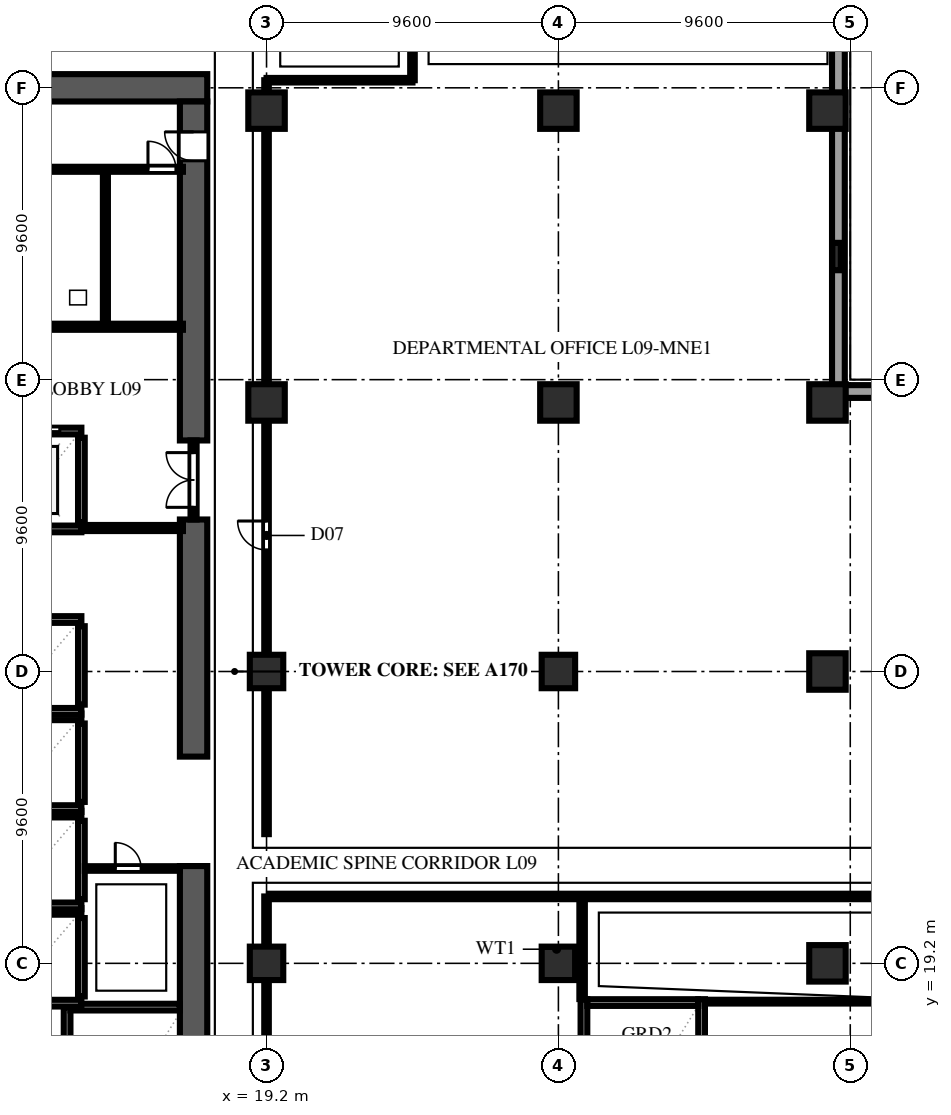
"""IFC4 building model, lengths in metres.
Left out: names, types, materials, properties, quantities, classifications, styles, units other than length and angle.
Written with IfcOpenShell. Run it as: python <this file> out.ifc"""

import sys

from ifc_helpers import new_model, si_unit, direction, frame, frame_2d, origin, origin_2d, place, context, subcontext, project, spatial, rectangle, extrude, element, fill, save


model = new_model("IFC4")
c1 = context("Model", 3, precision=1e-05, world=origin(), true_north=direction((0.0, 1.0)))
c2 = subcontext(c1, "Body", "Model", "MODEL_VIEW")
j1 = project(units=[si_unit("LENGTHUNIT", "METRE"), si_unit("PLANEANGLEUNIT", "RADIAN")], contexts=[c1])
p1 = place(None, origin())
s1 = spatial("IfcSite", under=j1, at=p1, CompositionType="ELEMENT")
p2 = place(p1, origin())
s2 = spatial("IfcBuilding", under=s1, at=p2, CompositionType="ELEMENT")
p3 = place(p2, frame((0.0, 0.0, 39.4)))
s3 = spatial("IfcBuildingStorey", under=s2, at=p3, CompositionType="ELEMENT", Elevation=39.4)
p4 = place(p3, frame((2.65, 48.0, 0.0), z_axis=(0.0, 0.0, 1.0), x_axis=(1.0, 0.0, 0.0)))
e1 = element("IfcWall", 1, at=p4, inside=s3, PredefinedType="SHEAR", context=c2, shape_type="SweptSolid", body=[
    extrude(rectangle(XDim=14.6, YDim=0.9, at=frame_2d((7.3, 0.0))), origin(), (0.0, 0.0, 1.0), 3.54),
])
p5 = place(p3, frame((16.8, 10.05, 0.0), z_axis=(0.0, 0.0, 1.0), x_axis=(0.0, 1.0, 0.0)))
e2 = element("IfcWall", 2, at=p5, inside=s3, PredefinedType="SHEAR", context=c2, shape_type="SweptSolid", body=[
    extrude(rectangle(XDim=12.35, YDim=0.9, at=frame_2d((6.175, 0.0))), origin(), (0.0, 0.0, 1.0), 3.54),
])
p6 = place(p5, frame((0.09, 0.0, 0.0)))
e3 = element("IfcOpeningElement", 3, at=p6, cuts=e2, PredefinedType="OPENING", context=c2, shape_type="SweptSolid", body=[
    extrude(rectangle(XDim=1.1, YDim=2.2, at=frame_2d((0.55, 1.1))), frame((0.0, 0.462, 0.0), z_axis=(0.0, -1.0, 0.0), x_axis=(1.0, 0.0, 0.0)), (0.0, 0.0, 1.0), 0.924),
])
p7 = place(p3, frame((16.8, 26.0, 0.0), z_axis=(0.0, 0.0, 1.0), x_axis=(0.0, 1.0, 0.0)))
e4 = element("IfcWall", 4, at=p7, inside=s3, PredefinedType="SHEAR", context=c2, shape_type="SweptSolid", body=[
    extrude(rectangle(XDim=7.8, YDim=0.9, at=frame_2d((3.9, 0.0))), origin(), (0.0, 0.0, 1.0), 3.54),
])
p8 = place(p3, frame((16.8, 36.4, 0.0), z_axis=(0.0, 0.0, 1.0), x_axis=(0.0, 1.0, 0.0)))
e5 = element("IfcWall", 5, at=p8, inside=s3, PredefinedType="SHEAR", context=c2, shape_type="SweptSolid", body=[
    extrude(rectangle(XDim=11.15, YDim=0.9, at=frame_2d((5.575, 0.0))), origin(), (0.0, 0.0, 1.0), 3.54),
])
p9 = place(p8, frame((9.2, 0.0, 0.0)))
e6 = element("IfcOpeningElement", 6, at=p9, cuts=e5, PredefinedType="OPENING", context=c2, shape_type="SweptSolid", body=[
    extrude(rectangle(XDim=0.95, YDim=2.15, at=frame_2d((0.475, 1.075))), frame((0.0, 0.462, 0.0), z_axis=(0.0, -1.0, 0.0), x_axis=(1.0, 0.0, 0.0)), (0.0, 0.0, 1.0), 0.924),
])
for number, where, z_axis, x_axis in (
    (7, (19.2, 19.2, 0.0), (0.0, 0.0, 1.0), (1.0, 0.0, 0.0)),
    (8, (19.2, 28.8, 0.0), (0.0, 0.0, 1.0), (1.0, 0.0, 0.0)),
):
    element("IfcColumn", number, at=place(p3, frame(where, z_axis=z_axis, x_axis=x_axis)), inside=s3, PredefinedType="COLUMN", context=c2, shape_type="SweptSolid", body=[
        extrude(rectangle(XDim=1.1, YDim=1.1, at=origin_2d()), origin(), (0.0, 0.0, 1.0), 3.8),
    ])
for number, where, z_axis, x_axis in (
    (9, (19.2, 37.65, 0.0), (0.0, 0.0, 1.0), (1.0, 0.0, 0.0)),
    (10, (19.2, 47.25, 0.0), (0.0, 0.0, 1.0), (1.0, 0.0, 0.0)),
):
    element("IfcColumn", number, at=place(p3, frame(where, z_axis=z_axis, x_axis=x_axis)), inside=s3, PredefinedType="COLUMN", context=c2, shape_type="SweptSolid", body=[
        extrude(rectangle(XDim=1.2, YDim=1.2, at=origin_2d()), origin(), (0.0, 0.0, 1.0), 3.8),
    ])
for number, where, z_axis, x_axis in (
    (11, (28.8, 19.2, 0.0), (0.0, 0.0, 1.0), (1.0, 0.0, 0.0)),
    (12, (28.8, 28.8, 0.0), (0.0, 0.0, 1.0), (1.0, 0.0, 0.0)),
):
    element("IfcColumn", number, at=place(p3, frame(where, z_axis=z_axis, x_axis=x_axis)), inside=s3, PredefinedType="COLUMN", context=c2, shape_type="SweptSolid", body=[
        extrude(rectangle(XDim=1.1, YDim=1.1, at=origin_2d()), origin(), (0.0, 0.0, 1.0), 3.8),
    ])
for number, where, z_axis, x_axis in (
    (13, (28.8, 37.65, 0.0), (0.0, 0.0, 1.0), (1.0, 0.0, 0.0)),
    (14, (28.8, 47.25, 0.0), (0.0, 0.0, 1.0), (1.0, 0.0, 0.0)),
    (15, (37.65, 19.2, 0.0), (0.0, 0.0, 1.0), (1.0, 0.0, 0.0)),
    (16, (37.65, 28.8, 0.0), (0.0, 0.0, 1.0), (1.0, 0.0, 0.0)),
    (17, (37.65, 37.65, 0.0), (0.0, 0.0, 1.0), (1.0, 0.0, 0.0)),
    (18, (37.65, 47.25, 0.0), (0.0, 0.0, 1.0), (1.0, 0.0, 0.0)),
):
    element("IfcColumn", number, at=place(p3, frame(where, z_axis=z_axis, x_axis=x_axis)), inside=s3, PredefinedType="COLUMN", context=c2, shape_type="SweptSolid", body=[
        extrude(rectangle(XDim=1.2, YDim=1.2, at=origin_2d()), origin(), (0.0, 0.0, 1.0), 3.8),
    ])
p10 = place(p3, frame((37.95, 42.45, 0.0), z_axis=(0.0, 0.0, 1.0), x_axis=(0.0, 1.0, 0.0)))
e19 = element("IfcColumn", 19, at=p10, inside=s3, PredefinedType="PILASTER", context=c2, shape_type="SweptSolid", body=[
    extrude(rectangle(XDim=0.9, YDim=0.28, at=origin_2d()), origin(), (0.0, 0.0, 1.0), 3.8),
])
for number, where, z_axis, x_axis in (
    (20, (65.36, 38.01, 0.0), (0.0, 0.0, 1.0), (-1.0, 0.0, 0.0)),
    (21, (38.01, 37.66, 0.0), (0.0, 0.0, 1.0), (0.0, 1.0, 0.0)),
):
    element("IfcWall", number, at=place(p3, frame(where, z_axis=z_axis, x_axis=x_axis)), inside=s3, PredefinedType="SOLIDWALL", context=c2, shape_type="SweptSolid", body=[
        extrude(rectangle(XDim=27.7, YDim=0.42, at=frame_2d((13.85, 0.0))), origin(), (0.0, 0.0, 1.0), 3.54),
    ])
p11 = place(p3, frame((12.64, 10.05, 0.0), z_axis=(0.0, 0.0, 1.0), x_axis=(0.0, 1.0, 0.0)))
e22 = element("IfcWall", 22, at=p11, inside=s3, PredefinedType="SOLIDWALL", context=c2, shape_type="SweptSolid", body=[
    extrude(rectangle(XDim=7.71, YDim=0.22, at=frame_2d((3.855, 0.0))), origin(), (0.0, 0.0, 1.0), 3.54),
])
p12 = place(p3, frame((12.75, 17.76, 0.0), z_axis=(0.0, 0.0, 1.0), x_axis=(1.0, 0.0, 0.0)))
e23 = element("IfcWall", 23, at=p12, inside=s3, PredefinedType="SOLIDWALL", context=c2, shape_type="SweptSolid", body=[
    extrude(rectangle(XDim=3.6, YDim=0.22, at=frame_2d((1.8, 0.0))), origin(), (0.0, 0.0, 1.0), 3.54),
])
for number, where, z_axis, x_axis in (
    (24, (29.64, 9.88, 0.0), (0.0, 0.0, 1.0), (0.0, 1.0, 0.0)),
    (25, (33.51, 9.88, 0.0), (0.0, 0.0, 1.0), (0.0, 1.0, 0.0)),
):
    element("IfcWall", number, at=place(p3, frame(where, z_axis=z_axis, x_axis=x_axis)), inside=s3, PredefinedType="SOLIDWALL", context=c2, shape_type="SweptSolid", body=[
        extrude(rectangle(XDim=8.14, YDim=0.22, at=frame_2d((4.07, 0.0))), origin(), (0.0, 0.0, 1.0), 3.54),
    ])
p13 = place(p3, frame((29.75, 17.91, 0.0), z_axis=(0.0, 0.0, 1.0), x_axis=(1.0, 0.0, 0.0)))
e26 = element("IfcWall", 26, at=p13, inside=s3, PredefinedType="SOLIDWALL", context=c2, shape_type="SweptSolid", body=[
    extrude(rectangle(XDim=3.65, YDim=0.22, at=frame_2d((1.825, 0.0))), origin(), (0.0, 0.0, 1.0), 3.54),
])
p14 = place(p3, frame((13.11, 18.11, 0.0), z_axis=(0.0, 0.0, 1.0), x_axis=(0.0, 1.0, 0.0)))
e27 = element("IfcWall", 27, at=p14, inside=s3, PredefinedType="SOLIDWALL", context=c2, shape_type="SweptSolid", body=[
    extrude(rectangle(XDim=2.58, YDim=0.22, at=frame_2d((1.29, 0.0))), origin(), (0.0, 0.0, 1.0), 3.54),
])
for number, where, z_axis, x_axis in (
    (28, (10.49, 17.89, 0.0), (0.0, 0.0, 1.0), (1.0, 0.0, 0.0)),
    (29, (10.49, 20.91, 0.0), (0.0, 0.0, 1.0), (1.0, 0.0, 0.0)),
):
    element("IfcWall", number, at=place(p3, frame(where, z_axis=z_axis, x_axis=x_axis)), inside=s3, PredefinedType="SOLIDWALL", context=c2, shape_type="SweptSolid", body=[
        extrude(rectangle(XDim=2.62, YDim=0.22, at=frame_2d((1.31, 0.0))), origin(), (0.0, 0.0, 1.0), 3.54),
    ])
p15 = place(p3, frame((13.11, 21.31, 0.0), z_axis=(0.0, 0.0, 1.0), x_axis=(0.0, 1.0, 0.0)))
e30 = element("IfcWall", 30, at=p15, inside=s3, PredefinedType="SOLIDWALL", context=c2, shape_type="SweptSolid", body=[
    extrude(rectangle(XDim=2.58, YDim=0.22, at=frame_2d((1.29, 0.0))), origin(), (0.0, 0.0, 1.0), 3.54),
])
for number, where, z_axis, x_axis in (
    (31, (10.49, 21.09, 0.0), (0.0, 0.0, 1.0), (1.0, 0.0, 0.0)),
    (32, (10.49, 24.11, 0.0), (0.0, 0.0, 1.0), (1.0, 0.0, 0.0)),
):
    element("IfcWall", number, at=place(p3, frame(where, z_axis=z_axis, x_axis=x_axis)), inside=s3, PredefinedType="SOLIDWALL", context=c2, shape_type="SweptSolid", body=[
        extrude(rectangle(XDim=2.62, YDim=0.22, at=frame_2d((1.31, 0.0))), origin(), (0.0, 0.0, 1.0), 3.54),
    ])
p16 = place(p3, frame((13.11, 24.51, 0.0), z_axis=(0.0, 0.0, 1.0), x_axis=(0.0, 1.0, 0.0)))
e33 = element("IfcWall", 33, at=p16, inside=s3, PredefinedType="SOLIDWALL", context=c2, shape_type="SweptSolid", body=[
    extrude(rectangle(XDim=2.58, YDim=0.22, at=frame_2d((1.29, 0.0))), origin(), (0.0, 0.0, 1.0), 3.54),
])
for number, where, z_axis, x_axis in (
    (34, (10.49, 24.29, 0.0), (0.0, 0.0, 1.0), (1.0, 0.0, 0.0)),
    (35, (10.49, 27.31, 0.0), (0.0, 0.0, 1.0), (1.0, 0.0, 0.0)),
):
    element("IfcWall", number, at=place(p3, frame(where, z_axis=z_axis, x_axis=x_axis)), inside=s3, PredefinedType="SOLIDWALL", context=c2, shape_type="SweptSolid", body=[
        extrude(rectangle(XDim=2.62, YDim=0.22, at=frame_2d((1.31, 0.0))), origin(), (0.0, 0.0, 1.0), 3.54),
    ])
p17 = place(p3, frame((13.11, 27.71, 0.0), z_axis=(0.0, 0.0, 1.0), x_axis=(0.0, 1.0, 0.0)))
e36 = element("IfcWall", 36, at=p17, inside=s3, PredefinedType="SOLIDWALL", context=c2, shape_type="SweptSolid", body=[
    extrude(rectangle(XDim=2.58, YDim=0.22, at=frame_2d((1.29, 0.0))), origin(), (0.0, 0.0, 1.0), 3.54),
])
for number, where, z_axis, x_axis in (
    (37, (10.49, 27.49, 0.0), (0.0, 0.0, 1.0), (1.0, 0.0, 0.0)),
    (38, (10.49, 30.51, 0.0), (0.0, 0.0, 1.0), (1.0, 0.0, 0.0)),
):
    element("IfcWall", number, at=place(p3, frame(where, z_axis=z_axis, x_axis=x_axis)), inside=s3, PredefinedType="SOLIDWALL", context=c2, shape_type="SweptSolid", body=[
        extrude(rectangle(XDim=2.62, YDim=0.22, at=frame_2d((1.31, 0.0))), origin(), (0.0, 0.0, 1.0), 3.54),
    ])
p18 = place(p3, frame((13.11, 33.71, 0.0), z_axis=(0.0, 0.0, 1.0), x_axis=(0.0, 1.0, 0.0)))
e39 = element("IfcWall", 39, at=p18, inside=s3, PredefinedType="SOLIDWALL", context=c2, shape_type="SweptSolid", body=[
    extrude(rectangle(XDim=2.78, YDim=0.22, at=frame_2d((1.39, 0.0))), origin(), (0.0, 0.0, 1.0), 3.54),
])
p19 = place(p3, frame((10.49, 33.49, 0.0), z_axis=(0.0, 0.0, 1.0), x_axis=(1.0, 0.0, 0.0)))
e40 = element("IfcWall", 40, at=p19, inside=s3, PredefinedType="SOLIDWALL", context=c2, shape_type="SweptSolid", body=[
    extrude(rectangle(XDim=2.62, YDim=0.22, at=frame_2d((1.31, 0.0))), origin(), (0.0, 0.0, 1.0), 3.54),
])
p20 = place(p3, frame((10.49, 36.71, 0.0), z_axis=(0.0, 0.0, 1.0), x_axis=(1.0, 0.0, 0.0)))
e41 = element("IfcWall", 41, at=p20, inside=s3, PredefinedType="SOLIDWALL", context=c2, shape_type="SweptSolid", body=[
    extrude(rectangle(XDim=2.62, YDim=0.22, at=frame_2d((1.31, 0.0))), origin(), (0.0, 0.0, 1.0), 3.54),
])
p21 = place(p20, frame((0.71, 0.0, 0.0)))
e42 = element("IfcOpeningElement", 42, at=p21, cuts=e41, PredefinedType="OPENING", context=c2, shape_type="SweptSolid", body=[
    extrude(rectangle(XDim=1.2, YDim=2.2, at=frame_2d((0.6, 1.1))), frame((0.0, 0.122, 0.0), z_axis=(0.0, -1.0, 0.0), x_axis=(1.0, 0.0, 0.0)), (0.0, 0.0, 1.0), 0.244),
])
p22 = place(p3, frame((13.12, 33.52, 0.0), z_axis=(0.0, 0.0, 1.0), x_axis=(1.0, 0.0, 0.0)))
e43 = element("IfcWall", 43, at=p22, inside=s3, PredefinedType="SOLIDWALL", context=c2, shape_type="SweptSolid", body=[
    extrude(rectangle(XDim=3.33, YDim=0.2, at=frame_2d((1.665, 0.0))), origin(), (0.0, 0.0, 1.0), 3.54),
])
p23 = place(p3, frame((6.32, 40.14, 0.0), z_axis=(0.0, 0.0, 1.0), x_axis=(1.0, 0.0, 0.0)))
e44 = element("IfcWall", 44, at=p23, inside=s3, PredefinedType="SOLIDWALL", context=c2, shape_type="SweptSolid", body=[
    extrude(rectangle(XDim=10.13, YDim=0.2, at=frame_2d((5.065, 0.0))), origin(), (0.0, 0.0, 1.0), 3.54),
])
p24 = place(p3, frame((16.8, 33.8, 0.0), z_axis=(0.0, 0.0, 1.0), x_axis=(0.0, 1.0, 0.0)))
e45 = element("IfcWall", 45, at=p24, inside=s3, PredefinedType="SOLIDWALL", context=c2, shape_type="SweptSolid", body=[
    extrude(rectangle(XDim=2.6, YDim=0.2, at=frame_2d((1.3, 0.0))), origin(), (0.0, 0.0, 1.0), 3.54),
])
p25 = place(p24, frame((0.4, 0.0, 0.0)))
e46 = element("IfcOpeningElement", 46, at=p25, cuts=e45, PredefinedType="OPENING", context=c2, shape_type="SweptSolid", body=[
    extrude(rectangle(XDim=1.8, YDim=2.2, at=frame_2d((0.9, 1.1))), frame((0.0, 0.112, 0.0), z_axis=(0.0, -1.0, 0.0), x_axis=(1.0, 0.0, 0.0)), (0.0, 0.0, 1.0), 0.224),
])
p26 = place(p3, frame((13.225, 22.32, 0.0), z_axis=(0.0, 0.0, 1.0), x_axis=(1.0, 0.0, 0.0)))
e47 = element("IfcWall", 47, at=p26, inside=s3, PredefinedType="PARTITIONING", context=c2, shape_type="SweptSolid", body=[
    extrude(rectangle(XDim=3.12, YDim=0.15, at=frame_2d((1.56, 0.0))), origin(), (0.0, 0.0, 1.0), 3.54),
])
p27 = place(p26, frame((1.0, 0.0, 0.0)))
e48 = element("IfcOpeningElement", 48, at=p27, cuts=e47, PredefinedType="OPENING", context=c2, shape_type="SweptSolid", body=[
    extrude(rectangle(XDim=0.85, YDim=2.1, at=frame_2d((0.425, 1.05))), frame((0.0, 0.087, 0.0), z_axis=(0.0, -1.0, 0.0), x_axis=(1.0, 0.0, 0.0)), (0.0, 0.0, 1.0), 0.174),
])
p28 = place(p3, frame((6.32, 45.32, 0.0), z_axis=(0.0, 0.0, 1.0), x_axis=(1.0, 0.0, 0.0)))
e49 = element("IfcWall", 49, at=p28, inside=s3, PredefinedType="PLUMBINGWALL", context=c2, shape_type="SweptSolid", body=[
    extrude(rectangle(XDim=10.13, YDim=0.165, at=frame_2d((5.065, 0.0))), origin(), (0.0, 0.0, 1.0), 3.54),
])
p29 = place(p28, frame((0.8, 0.0, 0.0)))
e50 = element("IfcOpeningElement", 50, at=p29, cuts=e49, PredefinedType="OPENING", context=c2, shape_type="SweptSolid", body=[
    extrude(rectangle(XDim=0.92, YDim=2.15, at=frame_2d((0.46, 1.075))), frame((0.0, 0.094, 0.0), z_axis=(0.0, -1.0, 0.0), x_axis=(1.0, 0.0, 0.0)), (0.0, 0.0, 1.0), 0.189),
])
p30 = place(p28, frame((4.1, 0.0, 0.0)))
e51 = element("IfcOpeningElement", 51, at=p30, cuts=e49, PredefinedType="OPENING", context=c2, shape_type="SweptSolid", body=[
    extrude(rectangle(XDim=0.92, YDim=2.15, at=frame_2d((0.46, 1.075))), frame((0.0, 0.094, 0.0), z_axis=(0.0, -1.0, 0.0), x_axis=(1.0, 0.0, 0.0)), (0.0, 0.0, 1.0), 0.189),
])
p31 = place(p28, frame((8.98, 0.0, 0.0)))
e52 = element("IfcOpeningElement", 52, at=p31, cuts=e49, PredefinedType="OPENING", context=c2, shape_type="SweptSolid", body=[
    extrude(rectangle(XDim=0.92, YDim=2.15, at=frame_2d((0.46, 1.075))), frame((0.0, 0.094, 0.0), z_axis=(0.0, -1.0, 0.0), x_axis=(1.0, 0.0, 0.0)), (0.0, 0.0, 1.0), 0.189),
])
p32 = place(p3, frame((13.9, 40.4, 0.0), z_axis=(0.0, 0.0, 1.0), x_axis=(0.0, 1.0, 0.0)))
e53 = element("IfcWall", 53, at=p32, inside=s3, PredefinedType="PLUMBINGWALL", context=c2, shape_type="SweptSolid", body=[
    extrude(rectangle(XDim=4.92, YDim=0.165, at=frame_2d((2.46, 0.0))), origin(), (0.0, 0.0, 1.0), 3.54),
])
p33 = place(p3, frame((19.2, 7.85, 0.0), z_axis=(0.0, 0.0, 1.0), x_axis=(0.0, 1.0, 0.0)))
e54 = element("IfcWall", 54, at=p33, inside=s3, PredefinedType="PARTITIONING", context=c2, shape_type="SweptSolid", body=[
    extrude(rectangle(XDim=13.55, YDim=0.15, at=frame_2d((6.775, 0.0))), origin(), (0.0, 0.0, 1.0), 3.123),
])
p34 = place(p33, frame((6.0, 0.0, 0.0)))
e55 = element("IfcOpeningElement", 55, at=p34, cuts=e54, PredefinedType="OPENING", context=c2, shape_type="SweptSolid", body=[
    extrude(rectangle(XDim=1.0, YDim=2.2, at=frame_2d((0.5, 1.1))), frame((0.0, 0.087, 0.0), z_axis=(0.0, -1.0, 0.0), x_axis=(1.0, 0.0, 0.0)), (0.0, 0.0, 1.0), 0.174),
])
p35 = place(p3, frame((29.58, 18.025, 0.0), z_axis=(0.0, 0.0, 1.0), x_axis=(0.0, 1.0, 0.0)))
e56 = element("IfcWall", 56, at=p35, inside=s3, PredefinedType="PARTITIONING", context=c2, shape_type="SweptSolid", body=[
    extrude(rectangle(XDim=3.28, YDim=0.18, at=frame_2d((1.64, 0.0))), origin(), (0.0, 0.0, 1.0), 3.54),
])
p36 = place(p3, frame((19.28, 21.4, 0.0), z_axis=(0.0, 0.0, 1.0), x_axis=(1.0, 0.0, 0.0)))
e57 = element("IfcWall", 57, at=p36, inside=s3, PredefinedType="PARTITIONING", context=c2, shape_type="SweptSolid", body=[
    extrude(rectangle(XDim=31.47, YDim=0.18, at=frame_2d((15.735, 0.0))), origin(), (0.0, 0.0, 1.0), 3.54),
])
p37 = place(p36, frame((22.67, 0.0, 0.0)))
e58 = element("IfcOpeningElement", 58, at=p37, cuts=e57, PredefinedType="OPENING", context=c2, shape_type="SweptSolid", body=[
    extrude(rectangle(XDim=1.2, YDim=2.2, at=frame_2d((0.6, 1.1))), frame((0.0, 0.102, 0.0), z_axis=(0.0, -1.0, 0.0), x_axis=(1.0, 0.0, 0.0)), (0.0, 0.0, 1.0), 0.204),
])
p38 = place(p3, frame((33.62, 17.94, 0.0), z_axis=(0.0, 0.0, 1.0), x_axis=(1.0, 0.0, 0.0)))
e59 = element("IfcWall", 59, at=p38, inside=s3, PredefinedType="PARTITIONING", context=c2, shape_type="SweptSolid", body=[
    extrude(rectangle(XDim=17.13, YDim=0.125, at=frame_2d((8.565, 0.0))), origin(), (0.0, 0.0, 1.0), 3.54),
])
p39 = place(p3, frame((19.2, 23.45, 0.0), z_axis=(0.0, 0.0, 1.0), x_axis=(0.0, 1.0, 0.0)))
e60 = element("IfcWall", 60, at=p39, inside=s3, PredefinedType="PARTITIONING", context=c2, shape_type="SweptSolid", body=[
    extrude(rectangle(XDim=24.8, YDim=0.15, at=frame_2d((12.4, 0.0))), origin(), (0.0, 0.0, 1.0), 3.123),
])
p40 = place(p39, frame((9.35, 0.0, 0.0)))
e61 = element("IfcOpeningElement", 61, at=p40, cuts=e60, PredefinedType="OPENING", context=c2, shape_type="SweptSolid", body=[
    extrude(rectangle(XDim=0.95, YDim=2.15, at=frame_2d((0.475, 1.075))), frame((0.0, 0.087, 0.0), z_axis=(0.0, -1.0, 0.0), x_axis=(1.0, 0.0, 0.0)), (0.0, 0.0, 1.0), 0.174),
])
p41 = place(p3, frame((19.2, 48.25, 0.0), z_axis=(0.0, 0.0, 1.0), x_axis=(1.0, 0.0, 0.0)))
e62 = element("IfcWall", 62, at=p41, inside=s3, PredefinedType="PARTITIONING", context=c2, shape_type="SweptSolid", body=[
    extrude(rectangle(XDim=4.8, YDim=0.15, at=frame_2d((2.4, 0.0))), origin(), (0.0, 0.0, 1.0), 3.54),
])
p42 = place(p3, frame((24.0, 48.25, 0.0), z_axis=(0.0, 0.0, 1.0), x_axis=(0.0, 1.0, 0.0)))
e63 = element("IfcWall", 63, at=p42, inside=s3, PredefinedType="PARTITIONING", context=c2, shape_type="SweptSolid", body=[
    extrude(rectangle(XDim=18.11, YDim=0.15, at=frame_2d((9.055, 0.0))), origin(), (0.0, 0.0, 1.0), 3.133),
])
p43 = place(p42, frame((3.4, 0.0, 0.0)))
e64 = element("IfcOpeningElement", 64, at=p43, cuts=e63, PredefinedType="OPENING", context=c2, shape_type="SweptSolid", body=[
    extrude(rectangle(XDim=1.0, YDim=2.2, at=frame_2d((0.5, 1.1))), frame((0.0, 0.087, 0.0), z_axis=(0.0, -1.0, 0.0), x_axis=(1.0, 0.0, 0.0)), (0.0, 0.0, 1.0), 0.174),
])
p44 = place(p21, origin())
e65 = element("IfcDoor", 65, at=p44, inside=s3, OperationType="DOUBLE_DOOR_SLIDING", PredefinedType="DOOR", context=c2, shape_type="SweptSolid", body=[
    extrude(rectangle(XDim=1.2, YDim=2.2, at=frame_2d((0.6, 1.1))), frame((0.0, 0.025, 0.0), z_axis=(0.0, -1.0, 0.0), x_axis=(1.0, 0.0, 0.0)), (0.0, 0.0, 1.0), 0.05),
])
fill(e42, e65)
p45 = place(p9, origin())
e66 = element("IfcDoor", 66, at=p45, inside=s3, OperationType="SINGLE_SWING_RIGHT", PredefinedType="DOOR", context=c2, shape_type="SweptSolid", body=[
    extrude(rectangle(XDim=0.95, YDim=2.15, at=frame_2d((0.475, 1.075))), frame((0.0, 0.025, 0.0), z_axis=(0.0, -1.0, 0.0), x_axis=(1.0, 0.0, 0.0)), (0.0, 0.0, 1.0), 0.05),
])
fill(e6, e66)
p46 = place(p25, origin())
e67 = element("IfcDoor", 67, at=p46, inside=s3, OperationType="DOUBLE_DOOR_SINGLE_SWING", PredefinedType="DOOR", context=c2, shape_type="SweptSolid", body=[
    extrude(rectangle(XDim=1.8, YDim=2.2, at=frame_2d((0.9, 1.1))), frame((0.0, 0.025, 0.0), z_axis=(0.0, -1.0, 0.0), x_axis=(1.0, 0.0, 0.0)), (0.0, 0.0, 1.0), 0.05),
])
fill(e46, e67)
p47 = place(p27, origin())
e68 = element("IfcDoor", 68, at=p47, inside=s3, OperationType="SINGLE_SWING_LEFT", PredefinedType="DOOR", context=c2, shape_type="SweptSolid", body=[
    extrude(rectangle(XDim=0.85, YDim=2.1, at=frame_2d((0.425, 1.05))), frame((0.0, 0.025, 0.0), z_axis=(0.0, -1.0, 0.0), x_axis=(1.0, 0.0, 0.0)), (0.0, 0.0, 1.0), 0.05),
])
fill(e48, e68)
p48 = place(p31, origin())
e69 = element("IfcDoor", 69, at=p48, inside=s3, OperationType="SINGLE_SWING_LEFT", PredefinedType="DOOR", context=c2, shape_type="SweptSolid", body=[
    extrude(rectangle(XDim=0.92, YDim=2.15, at=frame_2d((0.46, 1.075))), frame((0.0, 0.025, 0.0), z_axis=(0.0, -1.0, 0.0), x_axis=(1.0, 0.0, 0.0)), (0.0, 0.0, 1.0), 0.05),
])
fill(e52, e69)
p49 = place(p40, origin())
e70 = element("IfcDoor", 70, at=p49, inside=s3, OperationType="SINGLE_SWING_RIGHT", PredefinedType="DOOR", context=c2, shape_type="SweptSolid", body=[
    extrude(rectangle(XDim=0.95, YDim=2.15, at=frame_2d((0.475, 1.075))), frame((0.0, 0.025, 0.0), z_axis=(0.0, -1.0, 0.0), x_axis=(1.0, 0.0, 0.0)), (0.0, 0.0, 1.0), 0.05),
])
fill(e61, e70)
save(model, sys.argv[1])
